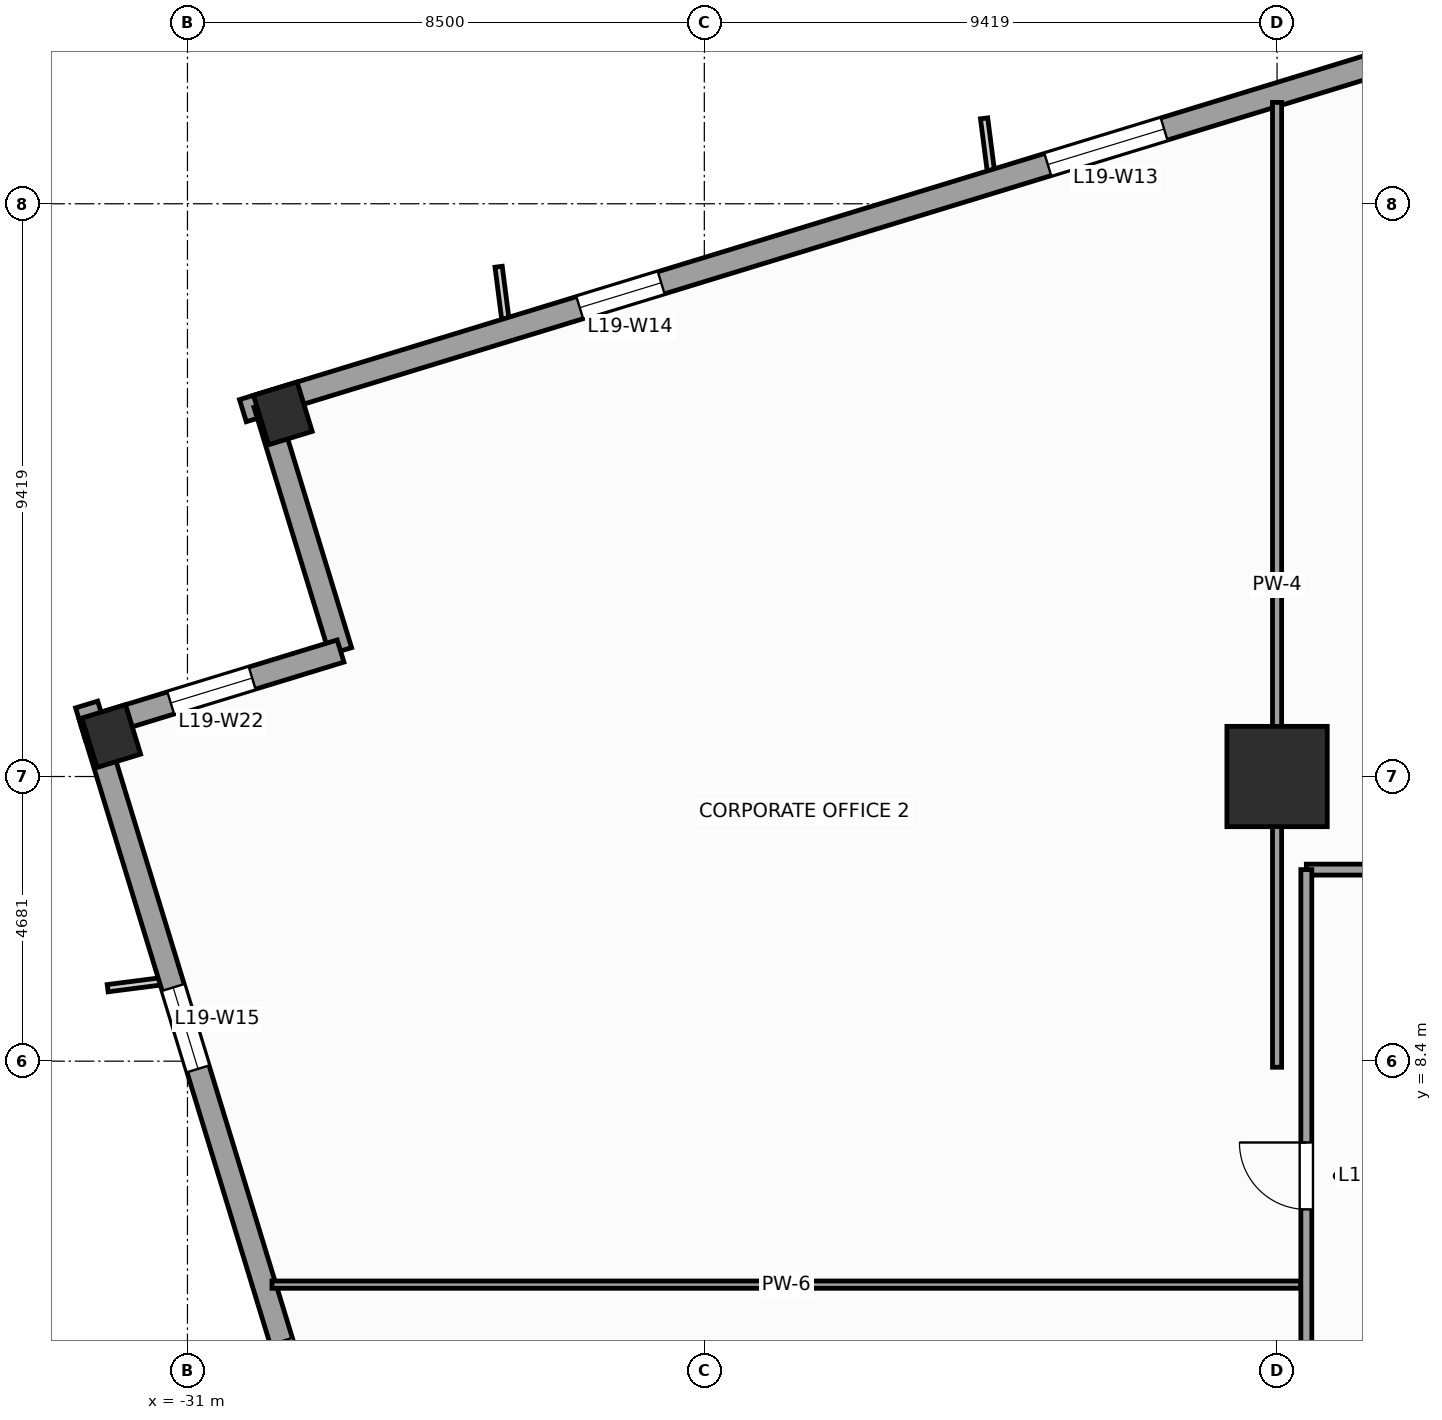
"""IFC4 building model, lengths in metres.
Left out: names, types, materials, properties, quantities, classifications, styles, units other than length and angle.
Written with IfcOpenShell. Run it as: python <this file> out.ifc"""

import sys

from ifc_helpers import new_model, si_unit, direction, frame, frame_2d, origin, origin_2d, place, context, subcontext, project, spatial, rectangle, extrude, source, transform, mapped, element, fill, save


model = new_model("IFC4")
c1 = context("Model", 3, precision=1e-05, world=origin(), true_north=direction((0.0, 1.0)))
c2 = subcontext(c1, "Body", "Model", "MODEL_VIEW")
j1 = project(units=[si_unit("LENGTHUNIT", "METRE"), si_unit("PLANEANGLEUNIT", "RADIAN")], contexts=[c1])
p1 = place(None, origin())
s1 = spatial("IfcSite", under=j1, at=p1, CompositionType="ELEMENT")
p2 = place(p1, origin())
s2 = spatial("IfcBuilding", under=s1, at=p2, CompositionType="ELEMENT")
p3 = place(p2, frame((0.0, 0.0, 83.2)))
s3 = spatial("IfcBuildingStorey", under=s2, at=p3, CompositionType="ELEMENT", Elevation=83.2)
m1 = source(origin(), c2, "Body", "SweptSolid", [
    extrude(rectangle(XDim=1.65, YDim=1.65, at=origin_2d()), origin(), (0.0, 0.0, 1.0), 4.0),
])
p4 = place(p3, frame((-13.081, 13.081, 0.0), z_axis=(0.0, 0.0, 1.0), x_axis=(1.0, 0.0, 0.0)))
e1 = element("IfcColumn", 1, at=p4, inside=s3, PredefinedType="COLUMN", context=c2, shape_type="MappedRepresentation", body=[
    mapped(m1, transform((0.0, 0.0, 0.0), scale=1.0)),
])
m2 = source(origin(), c2, "Body", "SweptSolid", [
    extrude(rectangle(XDim=0.75, YDim=0.85, at=origin_2d()), origin(), (0.0, 0.0, 1.0), 4.0),
])
for number, where, z_axis, x_axis in (
    (2, (-29.431, 19.052, 0.0), (0.0, 0.0, 1.0), (0.956, 0.292, 0.0)),
    (3, (-32.253, 13.746, 0.0), (0.0, 0.0, 1.0), (0.956, 0.292, 0.0)),
):
    element("IfcColumn", number, at=place(p3, frame(where, z_axis=z_axis, x_axis=x_axis)), inside=s3, PredefinedType="COLUMN", context=c2, shape_type="MappedRepresentation", body=[
        mapped(m2, transform((0.0, 0.0, 0.0), scale=1.0)),
    ])
p5 = place(p3, frame((14.265, 32.658, 0.0), z_axis=(0.0, 0.0, 1.0), x_axis=(-0.956304320851, -0.292373127906, 0.0)))
e4 = element("IfcWall", 4, at=p5, inside=s3, PredefinedType="STANDARD", context=c2, shape_type="SweptSolid", body=[
    extrude(rectangle(XDim=46.38, YDim=0.38, at=frame_2d((23.19, 0.0))), origin(), (0.0, 0.0, 1.0), 3.14),
])
p6 = place(p5, frame((4.865, 0.0, 0.51)))
e5 = element("IfcOpeningElement", 5, at=p6, cuts=e4, PredefinedType="OPENING", context=c2, shape_type="SweptSolid", body=[
    extrude(rectangle(XDim=1.4, YDim=2.4, at=frame_2d((0.7, 1.2))), frame((0.0, 0.2, 0.0), z_axis=(0.0, -1.0, 0.0), x_axis=(1.0, 0.0, 0.0)), (0.0, 0.0, 1.0), 0.4),
])
p7 = place(p5, frame((12.45, 0.0, 0.51)))
e6 = element("IfcOpeningElement", 6, at=p7, cuts=e4, PredefinedType="OPENING", context=c2, shape_type="SweptSolid", body=[
    extrude(rectangle(XDim=2.0, YDim=2.4, at=frame_2d((1.0, 1.2))), frame((0.0, 0.2, 0.0), z_axis=(0.0, -1.0, 0.0), x_axis=(1.0, 0.0, 0.0)), (0.0, 0.0, 1.0), 0.4),
])
p8 = place(p5, frame((19.012, 0.0, 0.51)))
e7 = element("IfcOpeningElement", 7, at=p8, cuts=e4, PredefinedType="OPENING", context=c2, shape_type="SweptSolid", body=[
    extrude(rectangle(XDim=2.0, YDim=2.4, at=frame_2d((1.0, 1.2))), frame((0.0, 0.2, 0.0), z_axis=(0.0, -1.0, 0.0), x_axis=(1.0, 0.0, 0.0)), (0.0, 0.0, 1.0), 0.4),
])
p9 = place(p5, frame((30.538, 0.0, 0.51)))
e8 = element("IfcOpeningElement", 8, at=p9, cuts=e4, PredefinedType="OPENING", context=c2, shape_type="SweptSolid", body=[
    extrude(rectangle(XDim=2.0, YDim=2.4, at=frame_2d((1.0, 1.2))), frame((0.0, 0.2, 0.0), z_axis=(0.0, -1.0, 0.0), x_axis=(1.0, 0.0, 0.0)), (0.0, 0.0, 1.0), 0.4),
])
p10 = place(p5, frame((39.187, 0.0, 0.51)))
e9 = element("IfcOpeningElement", 9, at=p10, cuts=e4, PredefinedType="OPENING", context=c2, shape_type="SweptSolid", body=[
    extrude(rectangle(XDim=1.4, YDim=2.4, at=frame_2d((0.7, 1.2))), frame((0.0, 0.2, 0.0), z_axis=(0.0, -1.0, 0.0), x_axis=(1.0, 0.0, 0.0)), (0.0, 0.0, 1.0), 0.4),
])
p11 = place(p3, frame((-29.725, 19.208, 0.0), z_axis=(0.0, 0.0, 1.0), x_axis=(0.292345507338, -0.956312764915, 0.0)))
e10 = element("IfcWall", 10, at=p11, inside=s3, PredefinedType="STANDARD", context=c2, shape_type="SweptSolid", body=[
    extrude(rectangle(XDim=4.25, YDim=0.38, at=frame_2d((2.125, 0.0))), origin(), (0.0, 0.0, 1.0), 3.74),
])
p12 = place(p3, frame((-28.482, 15.144, 0.0), z_axis=(0.0, 0.0, 1.0), x_axis=(-0.956304176051, -0.292373601522, 0.0)))
e11 = element("IfcWall", 11, at=p12, inside=s3, PredefinedType="STANDARD", context=c2, shape_type="SweptSolid", body=[
    extrude(rectangle(XDim=4.44, YDim=0.38, at=frame_2d((2.22, 0.0))), origin(), (0.0, 0.0, 1.0), 3.04),
])
p13 = place(p12, frame((1.52, 0.0, 0.51)))
e12 = element("IfcOpeningElement", 12, at=p13, cuts=e11, PredefinedType="OPENING", context=c2, shape_type="SweptSolid", body=[
    extrude(rectangle(XDim=1.4, YDim=2.4, at=frame_2d((0.7, 1.2))), frame((0.0, 0.2, 0.0), z_axis=(0.0, -1.0, 0.0), x_axis=(1.0, 0.0, 0.0)), (0.0, 0.0, 1.0), 0.4),
])
p14 = place(p3, frame((-32.658, 14.265, 0.0), z_axis=(0.0, 0.0, 1.0), x_axis=(0.292373127906, -0.956304320851, 0.0)))
e13 = element("IfcWall", 13, at=p14, inside=s3, PredefinedType="STANDARD", context=c2, shape_type="SweptSolid", body=[
    extrude(rectangle(XDim=46.38, YDim=0.38, at=frame_2d((23.19, 0.0))), origin(), (0.0, 0.0, 1.0), 3.14),
])
p15 = place(p14, frame((29.115, 0.0, 0.0)))
e14 = element("IfcOpeningElement", 14, at=p15, cuts=e13, PredefinedType="OPENING", context=c2, shape_type="SweptSolid", body=[
    extrude(rectangle(XDim=1.05, YDim=2.25, at=frame_2d((0.525, 1.125))), frame((0.0, 0.2, 0.0), z_axis=(0.0, -1.0, 0.0), x_axis=(1.0, 0.0, 0.0)), (0.0, 0.0, 1.0), 0.4),
])
p16 = place(p14, frame((4.865, 0.0, 0.51)))
e15 = element("IfcOpeningElement", 15, at=p16, cuts=e13, PredefinedType="OPENING", context=c2, shape_type="SweptSolid", body=[
    extrude(rectangle(XDim=1.4, YDim=2.4, at=frame_2d((0.7, 1.2))), frame((0.0, 0.2, 0.0), z_axis=(0.0, -1.0, 0.0), x_axis=(1.0, 0.0, 0.0)), (0.0, 0.0, 1.0), 0.4),
])
p17 = place(p14, frame((10.95, 0.0, 0.51)))
e16 = element("IfcOpeningElement", 16, at=p17, cuts=e13, PredefinedType="OPENING", context=c2, shape_type="SweptSolid", body=[
    extrude(rectangle(XDim=2.0, YDim=2.4, at=frame_2d((1.0, 1.2))), frame((0.0, 0.2, 0.0), z_axis=(0.0, -1.0, 0.0), x_axis=(1.0, 0.0, 0.0)), (0.0, 0.0, 1.0), 0.4),
])
p18 = place(p14, frame((19.012, 0.0, 0.51)))
e17 = element("IfcOpeningElement", 17, at=p18, cuts=e13, PredefinedType="OPENING", context=c2, shape_type="SweptSolid", body=[
    extrude(rectangle(XDim=2.0, YDim=2.4, at=frame_2d((1.0, 1.2))), frame((0.0, 0.2, 0.0), z_axis=(0.0, -1.0, 0.0), x_axis=(1.0, 0.0, 0.0)), (0.0, 0.0, 1.0), 0.4),
])
p19 = place(p14, frame((31.288, 0.0, 0.51)))
e18 = element("IfcOpeningElement", 18, at=p19, cuts=e13, PredefinedType="OPENING", context=c2, shape_type="SweptSolid", body=[
    extrude(rectangle(XDim=2.0, YDim=2.4, at=frame_2d((1.0, 1.2))), frame((0.0, 0.2, 0.0), z_axis=(0.0, -1.0, 0.0), x_axis=(1.0, 0.0, 0.0)), (0.0, 0.0, 1.0), 0.4),
])
p20 = place(p14, frame((39.187, 0.0, 0.51)))
e19 = element("IfcOpeningElement", 19, at=p20, cuts=e13, PredefinedType="OPENING", context=c2, shape_type="SweptSolid", body=[
    extrude(rectangle(XDim=1.4, YDim=2.4, at=frame_2d((0.7, 1.2))), frame((0.0, 0.2, 0.0), z_axis=(0.0, -1.0, 0.0), x_axis=(1.0, 0.0, 0.0)), (0.0, 0.0, 1.0), 0.4),
])
p21 = place(p3, frame((-12.6, 11.55, 0.0), z_axis=(0.0, 0.0, 1.0), x_axis=(1.0, 0.0, 0.0)))
e20 = element("IfcWall", 20, at=p21, inside=s3, PredefinedType="PARTITIONING", context=c2, shape_type="SweptSolid", body=[
    extrude(rectangle(XDim=23.05, YDim=0.18, at=frame_2d((11.525, 0.0))), origin(), (0.0, 0.0, 1.0), 3.74),
])
p22 = place(p21, frame((2.514, 0.0, 0.0)))
e21 = element("IfcOpeningElement", 21, at=p22, cuts=e20, PredefinedType="OPENING", context=c2, shape_type="SweptSolid", body=[
    extrude(rectangle(XDim=1.1, YDim=2.2, at=frame_2d((0.55, 1.1))), frame((0.0, 0.1, 0.0), z_axis=(0.0, -1.0, 0.0), x_axis=(1.0, 0.0, 0.0)), (0.0, 0.0, 1.0), 0.2),
])
p23 = place(p21, frame((8.05, 0.0, 0.0)))
e22 = element("IfcOpeningElement", 22, at=p23, cuts=e20, PredefinedType="OPENING", context=c2, shape_type="SweptSolid", body=[
    extrude(rectangle(XDim=1.1, YDim=2.2, at=frame_2d((0.55, 1.1))), frame((0.0, 0.1, 0.0), z_axis=(0.0, -1.0, 0.0), x_axis=(1.0, 0.0, 0.0)), (0.0, 0.0, 1.0), 0.2),
])
p24 = place(p21, frame((13.65, 0.0, 0.0)))
e23 = element("IfcOpeningElement", 23, at=p24, cuts=e20, PredefinedType="OPENING", context=c2, shape_type="SweptSolid", body=[
    extrude(rectangle(XDim=1.1, YDim=2.2, at=frame_2d((0.55, 1.1))), frame((0.0, 0.1, 0.0), z_axis=(0.0, -1.0, 0.0), x_axis=(1.0, 0.0, 0.0)), (0.0, 0.0, 1.0), 0.2),
])
p25 = place(p21, frame((19.311, 0.0, 0.0)))
e24 = element("IfcOpeningElement", 24, at=p25, cuts=e20, PredefinedType="OPENING", context=c2, shape_type="SweptSolid", body=[
    extrude(rectangle(XDim=1.1, YDim=2.2, at=frame_2d((0.55, 1.1))), frame((0.0, 0.1, 0.0), z_axis=(0.0, -1.0, 0.0), x_axis=(1.0, 0.0, 0.0)), (0.0, 0.0, 1.0), 0.2),
])
p26 = place(p3, frame((-12.6, 1.15, 0.0), z_axis=(0.0, 0.0, 1.0), x_axis=(0.0, 1.0, 0.0)))
e25 = element("IfcWall", 25, at=p26, inside=s3, PredefinedType="PARTITIONING", context=c2, shape_type="SweptSolid", body=[
    extrude(rectangle(XDim=10.4, YDim=0.18, at=frame_2d((5.2, 0.0))), origin(), (0.0, 0.0, 1.0), 3.74),
])
p27 = place(p26, frame((4.812, 0.0, 0.0)))
e26 = element("IfcOpeningElement", 26, at=p27, cuts=e25, PredefinedType="OPENING", context=c2, shape_type="SweptSolid", body=[
    extrude(rectangle(XDim=1.1, YDim=2.2, at=frame_2d((0.55, 1.1))), frame((0.0, 0.1, 0.0), z_axis=(0.0, -1.0, 0.0), x_axis=(1.0, 0.0, 0.0)), (0.0, 0.0, 1.0), 0.2),
])
p28 = place(p3, frame((-13.081, 8.3, 0.0), z_axis=(0.0, 0.0, 1.0), x_axis=(0.0, 1.0, 0.0)))
e27 = element("IfcWall", 27, at=p28, inside=s3, PredefinedType="PARTITIONING", context=c2, shape_type="SweptSolid", body=[
    extrude(rectangle(XDim=15.866, YDim=0.15, at=frame_2d((7.933, 0.0))), origin(), (0.0, 0.0, 1.0), 2.732),
])
p29 = place(p3, frame((-29.61, 4.725, 0.0), z_axis=(0.0, 0.0, 1.0), x_axis=(1.0, 0.0, 0.0)))
e28 = element("IfcWall", 28, at=p29, inside=s3, PredefinedType="PARTITIONING", context=c2, shape_type="SweptSolid", body=[
    extrude(rectangle(XDim=16.915, YDim=0.12, at=frame_2d((8.458, 0.0))), origin(), (0.0, 0.0, 1.0), 3.74),
])
m3 = source(origin(), c2, "Body", "SweptSolid", [
    extrude(rectangle(XDim=2.0, YDim=2.4, at=frame_2d((1.0, 1.2))), frame((0.0, 0.03, 0.0), z_axis=(0.0, -1.0, 0.0), x_axis=(1.0, 0.0, 0.0)), (0.0, 0.0, 1.0), 0.06),
])
p30 = place(p9, origin())
e29 = element("IfcWindow", 29, at=p30, inside=s3, PartitioningType="SINGLE_PANEL", PredefinedType="WINDOW", context=c2, shape_type="MappedRepresentation", body=[
    mapped(m3, transform((0.0, 0.0, 0.0), scale=1.0)),
])
fill(e8, e29)
m4 = source(origin(), c2, "Body", "SweptSolid", [
    extrude(rectangle(XDim=1.4, YDim=2.4, at=frame_2d((0.7, 1.2))), frame((0.0, 0.03, 0.0), z_axis=(0.0, -1.0, 0.0), x_axis=(1.0, 0.0, 0.0)), (0.0, 0.0, 1.0), 0.06),
])
p31 = place(p10, origin())
e30 = element("IfcWindow", 30, at=p31, inside=s3, PartitioningType="SINGLE_PANEL", PredefinedType="WINDOW", context=c2, shape_type="MappedRepresentation", body=[
    mapped(m4, transform((0.0, 0.0, 0.0), scale=1.0)),
])
fill(e9, e30)
p32 = place(p16, origin())
e31 = element("IfcWindow", 31, at=p32, inside=s3, PartitioningType="SINGLE_PANEL", PredefinedType="WINDOW", context=c2, shape_type="MappedRepresentation", body=[
    mapped(m4, transform((0.0, 0.0, 0.0), scale=1.0)),
])
fill(e15, e31)
p33 = place(p13, origin())
e32 = element("IfcWindow", 32, at=p33, inside=s3, PartitioningType="SINGLE_PANEL", PredefinedType="WINDOW", context=c2, shape_type="MappedRepresentation", body=[
    mapped(m4, transform((0.0, 0.0, 0.0), scale=1.0)),
])
fill(e12, e32)
m5 = source(origin(), c2, "Body", "SweptSolid", [
    extrude(rectangle(XDim=1.1, YDim=2.2, at=frame_2d((0.55, 1.1))), frame((0.0, 0.025, 0.0), z_axis=(0.0, -1.0, 0.0), x_axis=(1.0, 0.0, 0.0)), (0.0, 0.0, 1.0), 0.05),
])
p34 = place(p27, origin())
e33 = element("IfcDoor", 33, at=p34, inside=s3, OperationType="SINGLE_SWING_RIGHT", PredefinedType="DOOR", context=c2, shape_type="MappedRepresentation", body=[
    mapped(m5, transform((0.0, 0.0, 0.0), scale=1.0)),
])
fill(e26, e33)
save(model, sys.argv[1])
